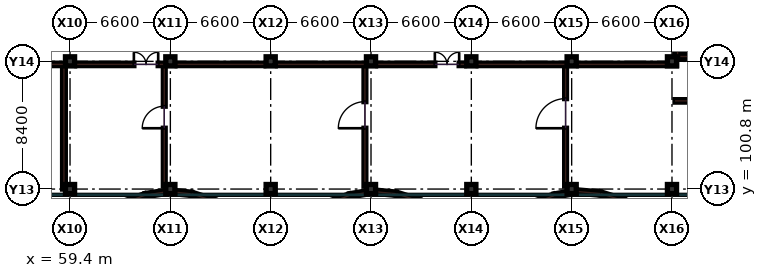
"""IFC4 building model, lengths in metres.
Left out: names, types, materials, properties, quantities, classifications, styles, units other than length and angle.
Written with IfcOpenShell. Run it as: python <this file> out.ifc"""

import sys

from ifc_helpers import new_model, si_unit, direction, frame, frame_2d, origin, origin_2d, place, context, subcontext, project, spatial, rectangle, extrude, element, fill, save


model = new_model("IFC4")
c1 = context("Model", 3, precision=1e-05, world=origin(), true_north=direction((0.0, 1.0)))
c2 = subcontext(c1, "Body", "Model", "MODEL_VIEW")
j1 = project(units=[si_unit("LENGTHUNIT", "METRE"), si_unit("PLANEANGLEUNIT", "RADIAN")], contexts=[c1])
p1 = place(None, origin())
s1 = spatial("IfcSite", under=j1, at=p1, CompositionType="ELEMENT")
p2 = place(p1, origin())
s2 = spatial("IfcBuilding", under=s1, at=p2, CompositionType="ELEMENT")
p3 = place(p2, frame((0.0, 0.0, 9.9)))
s3 = spatial("IfcBuildingStorey", under=s2, at=p3, CompositionType="ELEMENT", Elevation=9.9)
for number, where, z_axis, x_axis in (
    (1, (59.4, 100.8, 0.0), (0.0, 0.0, 1.0), (1.0, 0.0, 0.0)),
    (2, (59.4, 109.2, 0.0), (0.0, 0.0, 1.0), (1.0, 0.0, 0.0)),
    (3, (66.0, 100.8, 0.0), (0.0, 0.0, 1.0), (1.0, 0.0, 0.0)),
    (4, (66.0, 109.2, 0.0), (0.0, 0.0, 1.0), (1.0, 0.0, 0.0)),
    (5, (72.6, 100.8, 0.0), (0.0, 0.0, 1.0), (1.0, 0.0, 0.0)),
    (6, (72.6, 109.2, 0.0), (0.0, 0.0, 1.0), (1.0, 0.0, 0.0)),
    (7, (79.2, 100.8, 0.0), (0.0, 0.0, 1.0), (1.0, 0.0, 0.0)),
    (8, (79.2, 109.2, 0.0), (0.0, 0.0, 1.0), (1.0, 0.0, 0.0)),
    (9, (85.8, 100.8, 0.0), (0.0, 0.0, 1.0), (1.0, 0.0, 0.0)),
    (10, (85.8, 109.2, 0.0), (0.0, 0.0, 1.0), (1.0, 0.0, 0.0)),
    (11, (92.4, 100.8, 0.0), (0.0, 0.0, 1.0), (1.0, 0.0, 0.0)),
    (12, (92.4, 109.2, 0.0), (0.0, 0.0, 1.0), (1.0, 0.0, 0.0)),
    (13, (99.0, 100.8, 0.0), (0.0, 0.0, 1.0), (1.0, 0.0, 0.0)),
    (14, (99.0, 109.2, 0.0), (0.0, 0.0, 1.0), (1.0, 0.0, 0.0)),
):
    element("IfcColumn", number, at=place(p3, frame(where, z_axis=z_axis, x_axis=x_axis)), inside=s3, PredefinedType="COLUMN", context=c2, shape_type="SweptSolid", body=[
        extrude(rectangle(XDim=0.6, YDim=0.6, at=origin_2d()), origin(), (0.0, 0.0, 1.0), 4.5),
    ])
p4 = place(p3, frame((53.25, 109.0, 0.0), z_axis=(0.0, 0.0, 1.0), x_axis=(1.0, 0.0, 0.0)))
e15 = element("IfcWall", 15, at=p4, inside=s3, PredefinedType="PARTITIONING", context=c2, shape_type="SweptSolid", body=[
    extrude(rectangle(XDim=5.7, YDim=0.16, at=frame_2d((2.85, 0.0))), origin(), (0.0, 0.0, 1.0), 3.475),
])
p5 = place(p3, frame((59.85, 109.0, 0.0), z_axis=(0.0, 0.0, 1.0), x_axis=(1.0, 0.0, 0.0)))
e16 = element("IfcWall", 16, at=p5, inside=s3, PredefinedType="PARTITIONING", context=c2, shape_type="SweptSolid", body=[
    extrude(rectangle(XDim=5.7, YDim=0.16, at=frame_2d((2.85, 0.0))), origin(), (0.0, 0.0, 1.0), 3.475),
])
p6 = place(p5, frame((3.75, 0.0, 0.0)))
e17 = element("IfcOpeningElement", 17, at=p6, cuts=e16, PredefinedType="OPENING", context=c2, shape_type="SweptSolid", body=[
    extrude(rectangle(XDim=1.6, YDim=2.2, at=frame_2d((0.8, 1.1))), frame((0.0, 0.09, 0.0), z_axis=(0.0, -1.0, 0.0), x_axis=(1.0, 0.0, 0.0)), (0.0, 0.0, 1.0), 0.18),
])
for number, where, z_axis, x_axis in (
    (18, (66.45, 109.0, 0.0), (0.0, 0.0, 1.0), (1.0, 0.0, 0.0)),
    (19, (73.05, 109.0, 0.0), (0.0, 0.0, 1.0), (1.0, 0.0, 0.0)),
):
    element("IfcWall", number, at=place(p3, frame(where, z_axis=z_axis, x_axis=x_axis)), inside=s3, PredefinedType="PARTITIONING", context=c2, shape_type="SweptSolid", body=[
        extrude(rectangle(XDim=5.7, YDim=0.16, at=frame_2d((2.85, 0.0))), origin(), (0.0, 0.0, 1.0), 3.475),
    ])
p7 = place(p3, frame((79.65, 109.0, 0.0), z_axis=(0.0, 0.0, 1.0), x_axis=(1.0, 0.0, 0.0)))
e20 = element("IfcWall", 20, at=p7, inside=s3, PredefinedType="PARTITIONING", context=c2, shape_type="SweptSolid", body=[
    extrude(rectangle(XDim=5.7, YDim=0.16, at=frame_2d((2.85, 0.0))), origin(), (0.0, 0.0, 1.0), 3.475),
])
p8 = place(p7, frame((3.75, 0.0, 0.0)))
e21 = element("IfcOpeningElement", 21, at=p8, cuts=e20, PredefinedType="OPENING", context=c2, shape_type="SweptSolid", body=[
    extrude(rectangle(XDim=1.6, YDim=2.2, at=frame_2d((0.8, 1.1))), frame((0.0, 0.09, 0.0), z_axis=(0.0, -1.0, 0.0), x_axis=(1.0, 0.0, 0.0)), (0.0, 0.0, 1.0), 0.18),
])
p9 = place(p3, frame((86.25, 109.0, 0.0), z_axis=(0.0, 0.0, 1.0), x_axis=(1.0, 0.0, 0.0)))
e22 = element("IfcWall", 22, at=p9, inside=s3, PredefinedType="PARTITIONING", context=c2, shape_type="SweptSolid", body=[
    extrude(rectangle(XDim=5.7, YDim=0.16, at=frame_2d((2.85, 0.0))), origin(), (0.0, 0.0, 1.0), 3.475),
])
p10 = place(p3, frame((92.85, 109.0, 0.0), z_axis=(0.0, 0.0, 1.0), x_axis=(1.0, 0.0, 0.0)))
e23 = element("IfcWall", 23, at=p10, inside=s3, PredefinedType="PARTITIONING", context=c2, shape_type="SweptSolid", body=[
    extrude(rectangle(XDim=6.45, YDim=0.16, at=frame_2d((3.225, 0.0))), origin(), (0.0, 0.0, 1.0), 3.475),
])
p11 = place(p3, frame((59.0, 100.8, 0.0), z_axis=(0.0, 0.0, 1.0), x_axis=(0.0, 1.0, 0.0)))
e24 = element("IfcWall", 24, at=p11, inside=s3, PredefinedType="SOLIDWALL", context=c2, shape_type="SweptSolid", body=[
    extrude(rectangle(XDim=8.2, YDim=0.18, at=frame_2d((4.1, 0.0))), origin(), (0.0, 0.0, 1.0), 3.49),
])
p12 = place(p3, frame((65.6, 101.0, 0.0), z_axis=(0.0, 0.0, 1.0), x_axis=(0.0, 1.0, 0.0)))
e25 = element("IfcWall", 25, at=p12, inside=s3, PredefinedType="PARTITIONING", context=c2, shape_type="SweptSolid", body=[
    extrude(rectangle(XDim=8.0, YDim=0.12, at=frame_2d((4.0, 0.0))), origin(), (0.0, 0.0, 1.0), 3.49),
])
p13 = place(p12, frame((3.8, 0.0, 0.0)))
e26 = element("IfcOpeningElement", 26, at=p13, cuts=e25, PredefinedType="OPENING", context=c2, shape_type="SweptSolid", body=[
    extrude(rectangle(XDim=1.45, YDim=2.25, at=frame_2d((0.725, 1.125))), frame((0.0, 0.07, 0.0), z_axis=(0.0, -1.0, 0.0), x_axis=(1.0, 0.0, 0.0)), (0.0, 0.0, 1.0), 0.14),
])
p14 = place(p3, frame((78.8, 101.0, 0.0), z_axis=(0.0, 0.0, 1.0), x_axis=(0.0, 1.0, 0.0)))
e27 = element("IfcWall", 27, at=p14, inside=s3, PredefinedType="PARTITIONING", context=c2, shape_type="SweptSolid", body=[
    extrude(rectangle(XDim=8.0, YDim=0.12, at=frame_2d((4.0, 0.0))), origin(), (0.0, 0.0, 1.0), 3.49),
])
p15 = place(p14, frame((3.8, 0.0, 0.0)))
e28 = element("IfcOpeningElement", 28, at=p15, cuts=e27, PredefinedType="OPENING", context=c2, shape_type="SweptSolid", body=[
    extrude(rectangle(XDim=1.75, YDim=2.3, at=frame_2d((0.875, 1.15))), frame((0.0, 0.07, 0.0), z_axis=(0.0, -1.0, 0.0), x_axis=(1.0, 0.0, 0.0)), (0.0, 0.0, 1.0), 0.14),
])
p16 = place(p3, frame((92.0, 101.0, 0.0), z_axis=(0.0, 0.0, 1.0), x_axis=(0.0, 1.0, 0.0)))
e29 = element("IfcWall", 29, at=p16, inside=s3, PredefinedType="PARTITIONING", context=c2, shape_type="SweptSolid", body=[
    extrude(rectangle(XDim=8.0, YDim=0.12, at=frame_2d((4.0, 0.0))), origin(), (0.0, 0.0, 1.0), 3.49),
])
p17 = place(p16, frame((3.8, 0.0, 0.0)))
e30 = element("IfcOpeningElement", 30, at=p17, cuts=e29, PredefinedType="OPENING", context=c2, shape_type="SweptSolid", body=[
    extrude(rectangle(XDim=1.95, YDim=2.35, at=frame_2d((0.975, 1.175))), frame((0.0, 0.07, 0.0), z_axis=(0.0, -1.0, 0.0), x_axis=(1.0, 0.0, 0.0)), (0.0, 0.0, 1.0), 0.14),
])
p18 = place(p3, frame((99.2, 106.6, 0.0), z_axis=(0.0, 0.0, 1.0), x_axis=(1.0, 0.0, 0.0)))
e31 = element("IfcWall", 31, at=p18, inside=s3, PredefinedType="PARTITIONING", context=c2, shape_type="SweptSolid", body=[
    extrude(rectangle(XDim=12.9, YDim=0.16, at=frame_2d((6.45, 0.0))), origin(), (0.0, 0.0, 1.0), 3.49),
])
p19 = place(p18, frame((4.2, 0.0, 0.0)))
e32 = element("IfcOpeningElement", 32, at=p19, cuts=e31, PredefinedType="OPENING", context=c2, shape_type="SweptSolid", body=[
    extrude(rectangle(XDim=1.05, YDim=2.15, at=frame_2d((0.525, 1.075))), frame((0.0, 0.09, 0.0), z_axis=(0.0, -1.0, 0.0), x_axis=(1.0, 0.0, 0.0)), (0.0, 0.0, 1.0), 0.18),
])
p20 = place(p3, frame((62.84, 99.865, 0.0), z_axis=(0.0, 0.0, 1.0), x_axis=(0.943523944363, 0.331304341072, 0.0)))
e33 = element("IfcWall", 33, at=p20, inside=s3, PredefinedType="SOLIDWALL", context=c2, shape_type="SweptSolid", body=[
    extrude(rectangle(XDim=1.584, YDim=0.22, at=frame_2d((0.792, 0.0))), origin(), (0.0, 0.0, 1.0), 1.45),
])
p21 = place(p3, frame((64.36, 100.4, 0.0), z_axis=(0.0, 0.0, 1.0), x_axis=(0.987856970236, 0.155366039905, 0.0)))
e34 = element("IfcWall", 34, at=p21, inside=s3, PredefinedType="SOLIDWALL", context=c2, shape_type="SweptSolid", body=[
    extrude(rectangle(XDim=1.513, YDim=0.22, at=frame_2d((0.757, 0.0))), origin(), (0.0, 0.0, 1.0), 1.45),
])
p22 = place(p3, frame((65.89, 100.635, 0.0), z_axis=(0.0, 0.0, 1.0), x_axis=(0.995011417931, -0.099761105586, 0.0)))
e35 = element("IfcWall", 35, at=p22, inside=s3, PredefinedType="SOLIDWALL", context=c2, shape_type="SweptSolid", body=[
    extrude(rectangle(XDim=1.503, YDim=0.22, at=frame_2d((0.751, 0.0))), origin(), (0.0, 0.0, 1.0), 1.45),
])
p23 = place(p3, frame((67.415, 100.48, 0.0), z_axis=(0.0, 0.0, 1.0), x_axis=(0.952123971937, -0.305712188278, 0.0)))
e36 = element("IfcWall", 36, at=p23, inside=s3, PredefinedType="SOLIDWALL", context=c2, shape_type="SweptSolid", body=[
    extrude(rectangle(XDim=1.57, YDim=0.22, at=frame_2d((0.785, 0.0))), origin(), (0.0, 0.0, 1.0), 1.45),
])
p24 = place(p3, frame((76.29, 99.845, 0.0), z_axis=(0.0, 0.0, 1.0), x_axis=(0.942509092402, 0.334180506223, 0.0)))
e37 = element("IfcWall", 37, at=p24, inside=s3, PredefinedType="SOLIDWALL", context=c2, shape_type="SweptSolid", body=[
    extrude(rectangle(XDim=1.586, YDim=0.22, at=frame_2d((0.793, 0.0))), origin(), (0.0, 0.0, 1.0), 1.45),
])
p25 = place(p3, frame((77.805, 100.385, 0.0), z_axis=(0.0, 0.0, 1.0), x_axis=(0.986306728251, 0.164921307924, 0.0)))
e38 = element("IfcWall", 38, at=p25, inside=s3, PredefinedType="SOLIDWALL", context=c2, shape_type="SweptSolid", body=[
    extrude(rectangle(XDim=1.516, YDim=0.22, at=frame_2d((0.758, 0.0))), origin(), (0.0, 0.0, 1.0), 1.45),
])
p26 = place(p3, frame((79.34, 100.635, 0.0), z_axis=(0.0, 0.0, 1.0), x_axis=(0.995649796121, -0.093174478716, 0.0)))
e39 = element("IfcWall", 39, at=p26, inside=s3, PredefinedType="SOLIDWALL", context=c2, shape_type="SweptSolid", body=[
    extrude(rectangle(XDim=1.501, YDim=0.22, at=frame_2d((0.751, 0.0))), origin(), (0.0, 0.0, 1.0), 1.45),
])
p27 = place(p3, frame((80.86, 100.49, 0.0), z_axis=(0.0, 0.0, 1.0), x_axis=(0.95396570108, -0.299915723433, 0.0)))
e40 = element("IfcWall", 40, at=p27, inside=s3, PredefinedType="SOLIDWALL", context=c2, shape_type="SweptSolid", body=[
    extrude(rectangle(XDim=1.567, YDim=0.22, at=frame_2d((0.783, 0.0))), origin(), (0.0, 0.0, 1.0), 1.45),
])
p28 = place(p3, frame((89.74, 99.825, 0.0), z_axis=(0.0, 0.0, 1.0), x_axis=(0.941505155303, 0.336998579429, 0.0)))
e41 = element("IfcWall", 41, at=p28, inside=s3, PredefinedType="SOLIDWALL", context=c2, shape_type="SweptSolid", body=[
    extrude(rectangle(XDim=1.588, YDim=0.22, at=frame_2d((0.794, 0.0))), origin(), (0.0, 0.0, 1.0), 1.45),
])
p29 = place(p3, frame((91.255, 100.37, 0.0), z_axis=(0.0, 0.0, 1.0), x_axis=(0.984665168251, 0.174454883663, 0.0)))
e42 = element("IfcWall", 42, at=p29, inside=s3, PredefinedType="SOLIDWALL", context=c2, shape_type="SweptSolid", body=[
    extrude(rectangle(XDim=1.518, YDim=0.22, at=frame_2d((0.759, 0.0))), origin(), (0.0, 0.0, 1.0), 1.45),
])
p30 = place(p3, frame((92.785, 100.635, 0.0), z_axis=(0.0, 0.0, 1.0), x_axis=(0.996233870581, -0.086706834262, 0.0)))
e43 = element("IfcWall", 43, at=p30, inside=s3, PredefinedType="SOLIDWALL", context=c2, shape_type="SweptSolid", body=[
    extrude(rectangle(XDim=1.501, YDim=0.22, at=frame_2d((0.75, 0.0))), origin(), (0.0, 0.0, 1.0), 1.45),
])
p31 = place(p3, frame((94.31, 100.5, 0.0), z_axis=(0.0, 0.0, 1.0), x_axis=(0.955507790724, -0.294965865595, 0.0)))
e44 = element("IfcWall", 44, at=p31, inside=s3, PredefinedType="SOLIDWALL", context=c2, shape_type="SweptSolid", body=[
    extrude(rectangle(XDim=1.559, YDim=0.22, at=frame_2d((0.78, 0.0))), origin(), (0.0, 0.0, 1.0), 1.45),
])
p32 = place(p3, frame((99.37, 109.34, 0.0), z_axis=(0.0, 0.0, 1.0), x_axis=(0.0, 1.0, 0.0)))
e45 = element("IfcWall", 45, at=p32, inside=s3, PredefinedType="SHEAR", context=c2, shape_type="SweptSolid", body=[
    extrude(rectangle(XDim=8.09, YDim=0.36, at=frame_2d((4.045, 0.0))), origin(), (0.0, 0.0, 1.0), 4.24),
])
p33 = place(p3, frame((99.55, 109.52, 0.0), z_axis=(0.0, 0.0, 1.0), x_axis=(1.0, 0.0, 0.0)))
e46 = element("IfcWall", 46, at=p33, inside=s3, PredefinedType="SHEAR", context=c2, shape_type="SweptSolid", body=[
    extrude(rectangle(XDim=3.8, YDim=0.36, at=frame_2d((1.9, 0.0))), origin(), (0.0, 0.0, 1.0), 4.24),
])
p34 = place(p6, origin())
e47 = element("IfcDoor", 47, at=p34, inside=s3, OperationType="DOUBLE_DOOR_SINGLE_SWING", PredefinedType="DOOR", context=c2, shape_type="SweptSolid", body=[
    extrude(rectangle(XDim=1.6, YDim=2.2, at=frame_2d((0.8, 1.1))), frame((0.0, 0.025, 0.0), z_axis=(0.0, -1.0, 0.0), x_axis=(1.0, 0.0, 0.0)), (0.0, 0.0, 1.0), 0.05),
])
fill(e17, e47)
p35 = place(p8, origin())
e48 = element("IfcDoor", 48, at=p35, inside=s3, OperationType="DOUBLE_DOOR_SINGLE_SWING", PredefinedType="DOOR", context=c2, shape_type="SweptSolid", body=[
    extrude(rectangle(XDim=1.6, YDim=2.2, at=frame_2d((0.8, 1.1))), frame((0.0, 0.025, 0.0), z_axis=(0.0, -1.0, 0.0), x_axis=(1.0, 0.0, 0.0)), (0.0, 0.0, 1.0), 0.05),
])
fill(e21, e48)
p36 = place(p13, origin())
e49 = element("IfcDoor", 49, at=p36, inside=s3, OperationType="SINGLE_SWING_LEFT", PredefinedType="DOOR", context=c2, shape_type="SweptSolid", body=[
    extrude(rectangle(XDim=1.45, YDim=2.25, at=frame_2d((0.725, 1.125))), frame((0.0, 0.025, 0.0), z_axis=(0.0, -1.0, 0.0), x_axis=(1.0, 0.0, 0.0)), (0.0, 0.0, 1.0), 0.05),
])
fill(e26, e49)
p37 = place(p15, origin())
e50 = element("IfcDoor", 50, at=p37, inside=s3, OperationType="SINGLE_SWING_LEFT", PredefinedType="DOOR", context=c2, shape_type="SweptSolid", body=[
    extrude(rectangle(XDim=1.75, YDim=2.3, at=frame_2d((0.875, 1.15))), frame((0.0, 0.025, 0.0), z_axis=(0.0, -1.0, 0.0), x_axis=(1.0, 0.0, 0.0)), (0.0, 0.0, 1.0), 0.05),
])
fill(e28, e50)
p38 = place(p17, origin())
e51 = element("IfcDoor", 51, at=p38, inside=s3, OperationType="SINGLE_SWING_LEFT", PredefinedType="DOOR", context=c2, shape_type="SweptSolid", body=[
    extrude(rectangle(XDim=1.95, YDim=2.35, at=frame_2d((0.975, 1.175))), frame((0.0, 0.025, 0.0), z_axis=(0.0, -1.0, 0.0), x_axis=(1.0, 0.0, 0.0)), (0.0, 0.0, 1.0), 0.05),
])
fill(e30, e51)
save(model, sys.argv[1])
